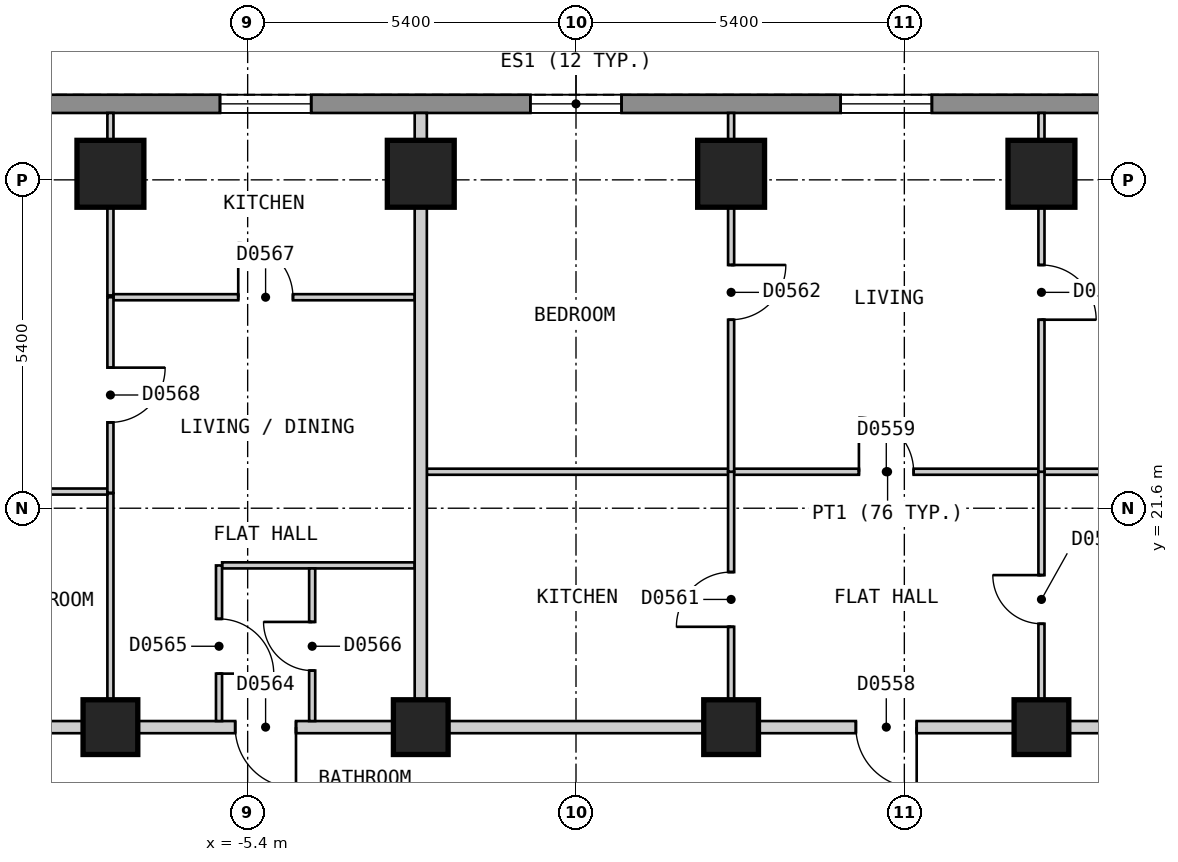
"""IFC4 building model, lengths in metres.
Left out: names, types, materials, properties, quantities, classifications, styles, units other than length and angle.
Written with IfcOpenShell. Run it as: python <this file> out.ifc"""

import sys

from ifc_helpers import new_model, si_unit, direction, frame, frame_2d, origin, origin_2d, place, context, subcontext, project, spatial, polyline, rectangle, outline, extrude, element, fill, save


model = new_model("IFC4")
c1 = context("Model", 3, precision=1e-05, world=origin(), true_north=direction((0.0, 1.0)))
c2 = subcontext(c1, "Body", "Model", "MODEL_VIEW")
j1 = project(units=[si_unit("LENGTHUNIT", "METRE"), si_unit("PLANEANGLEUNIT", "RADIAN")], contexts=[c1])
p1 = place(None, origin())
s1 = spatial("IfcSite", under=j1, at=p1, CompositionType="ELEMENT")
p2 = place(p1, origin())
s2 = spatial("IfcBuilding", under=s1, at=p2, CompositionType="ELEMENT")
p3 = place(p2, frame((0.0, 0.0, 44.4)))
s3 = spatial("IfcBuildingStorey", under=s2, at=p3, CompositionType="ELEMENT", Elevation=44.4)
for number, where, z_axis, x_axis in (
    (1, (7.655, 27.1, 0.0), (0.0, 0.0, 1.0), (-1.0, 0.0, 0.0)),
    (2, (2.551, 27.1, 0.0), (0.0, 0.0, 1.0), (-1.0, 0.0, 0.0)),
    (3, (-2.553, 27.1, 0.0), (0.0, 0.0, 1.0), (-1.0, 0.0, 0.0)),
    (4, (-7.657, 27.1, 0.0), (0.0, 0.0, 1.0), (-1.0, 0.0, 0.0)),
):
    element("IfcColumn", number, at=place(p3, frame(where, z_axis=z_axis, x_axis=x_axis)), inside=s3, PredefinedType="COLUMN", context=c2, shape_type="SweptSolid", body=[
        extrude(rectangle(XDim=1.1, YDim=1.1, at=origin_2d()), origin(), (0.0, 0.0, 1.0), 3.0),
    ])
for number, where, z_axis, x_axis in (
    (5, (7.655, 18.0, 0.0), (0.0, 0.0, 1.0), (-1.0, 0.0, 0.0)),
    (6, (2.551, 18.0, 0.0), (0.0, 0.0, 1.0), (-1.0, 0.0, 0.0)),
    (7, (-2.553, 18.0, 0.0), (0.0, 0.0, 1.0), (-1.0, 0.0, 0.0)),
    (8, (-7.657, 18.0, 0.0), (0.0, 0.0, 1.0), (-1.0, 0.0, 0.0)),
):
    element("IfcColumn", number, at=place(p3, frame(where, z_axis=z_axis, x_axis=x_axis)), inside=s3, PredefinedType="COLUMN", context=c2, shape_type="SweptSolid", body=[
        extrude(rectangle(XDim=0.9, YDim=0.9, at=origin_2d()), origin(), (0.0, 0.0, 1.0), 3.0),
    ])
p4 = place(p3, frame((13.51, 28.25, 0.0), z_axis=(0.0, 0.0, 1.0), x_axis=(-1.0, 0.0, 0.0)))
e9 = element("IfcWall", 9, at=p4, inside=s3, PredefinedType="SOLIDWALL", context=c2, shape_type="SweptSolid", body=[
    extrude(outline(polyline([(0.0, -0.15), (27.02, -0.15), (26.94, 0.15), (0.08, 0.15), (0.0, -0.15)])), origin(), (0.0, 0.0, 1.0), 2.7),
])
p5 = place(p4, frame((2.553, 0.0, 0.15)))
e10 = element("IfcOpeningElement", 10, at=p5, cuts=e9, PredefinedType="OPENING", context=c2, shape_type="SweptSolid", body=[
    extrude(rectangle(XDim=1.5, YDim=2.1, at=frame_2d((0.75, 1.05))), frame((0.0, 0.16, 0.0), z_axis=(0.0, -1.0, 0.0), x_axis=(1.0, 0.0, 0.0)), (0.0, 0.0, 1.0), 0.32),
])
p6 = place(p4, frame((7.657, 0.0, 0.15)))
e11 = element("IfcOpeningElement", 11, at=p6, cuts=e9, PredefinedType="OPENING", context=c2, shape_type="SweptSolid", body=[
    extrude(rectangle(XDim=1.5, YDim=2.1, at=frame_2d((0.75, 1.05))), frame((0.0, 0.16, 0.0), z_axis=(0.0, -1.0, 0.0), x_axis=(1.0, 0.0, 0.0)), (0.0, 0.0, 1.0), 0.32),
])
p7 = place(p4, frame((12.761, 0.0, 0.15)))
e12 = element("IfcOpeningElement", 12, at=p7, cuts=e9, PredefinedType="OPENING", context=c2, shape_type="SweptSolid", body=[
    extrude(rectangle(XDim=1.5, YDim=2.1, at=frame_2d((0.75, 1.05))), frame((0.0, 0.16, 0.0), z_axis=(0.0, -1.0, 0.0), x_axis=(1.0, 0.0, 0.0)), (0.0, 0.0, 1.0), 0.32),
])
p8 = place(p4, frame((17.865, 0.0, 0.15)))
e13 = element("IfcOpeningElement", 13, at=p8, cuts=e9, PredefinedType="OPENING", context=c2, shape_type="SweptSolid", body=[
    extrude(rectangle(XDim=1.5, YDim=2.1, at=frame_2d((0.75, 1.05))), frame((0.0, 0.16, 0.0), z_axis=(0.0, -1.0, 0.0), x_axis=(1.0, 0.0, 0.0)), (0.0, 0.0, 1.0), 0.32),
])
p9 = place(p4, frame((22.969, 0.0, 0.15)))
e14 = element("IfcOpeningElement", 14, at=p9, cuts=e9, PredefinedType="OPENING", context=c2, shape_type="SweptSolid", body=[
    extrude(rectangle(XDim=1.5, YDim=2.1, at=frame_2d((0.75, 1.05))), frame((0.0, 0.16, 0.0), z_axis=(0.0, -1.0, 0.0), x_axis=(1.0, 0.0, 0.0)), (0.0, 0.0, 1.0), 0.32),
])
p10 = place(p3, frame((-10.276, 18.0, 0.0), z_axis=(0.0, 0.0, 1.0), x_axis=(1.0, 0.0, 0.0)))
e15 = element("IfcWall", 15, at=p10, inside=s3, PredefinedType="PARTITIONING", context=c2, shape_type="SweptSolid", body=[
    extrude(rectangle(XDim=20.553, YDim=0.2, at=frame_2d((10.276, 0.0))), origin(), (0.0, 0.0, 1.0), 2.7),
])
p11 = place(p10, frame((14.879, 0.0, 0.0)))
e16 = element("IfcOpeningElement", 16, at=p11, cuts=e15, PredefinedType="OPENING", context=c2, shape_type="SweptSolid", body=[
    extrude(rectangle(XDim=1.0, YDim=2.1, at=frame_2d((0.5, 1.05))), frame((0.0, 0.11, 0.0), z_axis=(0.0, -1.0, 0.0), x_axis=(1.0, 0.0, 0.0)), (0.0, 0.0, 1.0), 0.22),
])
p12 = place(p10, frame((4.671, 0.0, 0.0)))
e17 = element("IfcOpeningElement", 17, at=p12, cuts=e15, PredefinedType="OPENING", context=c2, shape_type="SweptSolid", body=[
    extrude(rectangle(XDim=1.0, YDim=2.1, at=frame_2d((0.5, 1.05))), frame((0.0, 0.11, 0.0), z_axis=(0.0, -1.0, 0.0), x_axis=(1.0, 0.0, 0.0)), (0.0, 0.0, 1.0), 0.22),
])
p13 = place(p3, frame((-7.657, 28.1, 0.0), z_axis=(0.0, 0.0, 1.0), x_axis=(0.0, -1.0, 0.0)))
e18 = element("IfcWall", 18, at=p13, inside=s3, PredefinedType="PARTITIONING", context=c2, shape_type="SweptSolid", body=[
    extrude(rectangle(XDim=3.0, YDim=0.1, at=frame_2d((1.5, 0.0))), origin(), (0.0, 0.0, 1.0), 2.7),
])
p14 = place(p3, frame((-7.657, 21.844, 0.0), z_axis=(0.0, 0.0, 1.0), x_axis=(0.0, -1.0, 0.0)))
e19 = element("IfcWall", 19, at=p14, inside=s3, PredefinedType="PARTITIONING", context=c2, shape_type="SweptSolid", body=[
    extrude(rectangle(XDim=3.744, YDim=0.1, at=frame_2d((1.872, 0.0))), origin(), (0.0, 0.0, 1.0), 2.7),
])
p15 = place(p3, frame((-5.82, 20.66, 0.0), z_axis=(0.0, 0.0, 1.0), x_axis=(1.0, 0.0, 0.0)))
e20 = element("IfcWall", 20, at=p15, inside=s3, PredefinedType="PARTITIONING", context=c2, shape_type="SweptSolid", body=[
    extrude(rectangle(XDim=3.167, YDim=0.1, at=frame_2d((1.583, 0.0))), origin(), (0.0, 0.0, 1.0), 2.7),
])
p16 = place(p3, frame((-12.513, 21.874, 0.0), z_axis=(0.0, 0.0, 1.0), x_axis=(1.0, 0.0, 0.0)))
e21 = element("IfcWall", 21, at=p16, inside=s3, PredefinedType="PARTITIONING", context=c2, shape_type="SweptSolid", body=[
    extrude(rectangle(XDim=4.806, YDim=0.1, at=frame_2d((2.403, 0.0))), origin(), (0.0, 0.0, 1.0), 2.7),
])
p17 = place(p16, frame((1.97, 0.0, 0.0)))
e22 = element("IfcOpeningElement", 22, at=p17, cuts=e21, PredefinedType="OPENING", context=c2, shape_type="SweptSolid", body=[
    extrude(rectangle(XDim=0.8, YDim=2.1, at=frame_2d((0.4, 1.05))), frame((0.0, 0.06, 0.0), z_axis=(0.0, -1.0, 0.0), x_axis=(1.0, 0.0, 0.0)), (0.0, 0.0, 1.0), 0.12),
])
p18 = place(p3, frame((-2.453, 22.2, 0.0), z_axis=(0.0, 0.0, 1.0), x_axis=(1.0, 0.0, 0.0)))
e23 = element("IfcWall", 23, at=p18, inside=s3, PredefinedType="PARTITIONING", context=c2, shape_type="SweptSolid", body=[
    extrude(rectangle(XDim=15.155, YDim=0.1, at=frame_2d((7.577, 0.0))), origin(), (0.0, 0.0, 1.0), 2.7),
])
p19 = place(p18, frame((7.106, 0.0, 0.0)))
e24 = element("IfcOpeningElement", 24, at=p19, cuts=e23, PredefinedType="OPENING", context=c2, shape_type="SweptSolid", body=[
    extrude(rectangle(XDim=0.9, YDim=2.1, at=frame_2d((0.45, 1.05))), frame((0.0, 0.06, 0.0), z_axis=(0.0, -1.0, 0.0), x_axis=(1.0, 0.0, 0.0)), (0.0, 0.0, 1.0), 0.12),
])
p20 = place(p3, frame((-7.607, 25.07, 0.0), z_axis=(0.0, 0.0, 1.0), x_axis=(1.0, 0.0, 0.0)))
e25 = element("IfcWall", 25, at=p20, inside=s3, PredefinedType="PARTITIONING", context=c2, shape_type="SweptSolid", body=[
    extrude(rectangle(XDim=4.954, YDim=0.1, at=frame_2d((2.477, 0.0))), origin(), (0.0, 0.0, 1.0), 2.7),
])
p21 = place(p20, frame((2.052, 0.0, 0.0)))
e26 = element("IfcOpeningElement", 26, at=p21, cuts=e25, PredefinedType="OPENING", context=c2, shape_type="SweptSolid", body=[
    extrude(rectangle(XDim=0.9, YDim=2.1, at=frame_2d((0.45, 1.05))), frame((0.0, 0.06, 0.0), z_axis=(0.0, -1.0, 0.0), x_axis=(1.0, 0.0, 0.0)), (0.0, 0.0, 1.0), 0.12),
])
p22 = place(p3, frame((7.655, 18.1, 0.0), z_axis=(0.0, 0.0, 1.0), x_axis=(0.0, 1.0, 0.0)))
e27 = element("IfcWall", 27, at=p22, inside=s3, PredefinedType="PARTITIONING", context=c2, shape_type="SweptSolid", body=[
    extrude(rectangle(XDim=4.1, YDim=0.1, at=frame_2d((2.05, 0.0))), origin(), (0.0, 0.0, 1.0), 2.7),
])
p23 = place(p22, frame((1.6, 0.0, 0.0)))
e28 = element("IfcOpeningElement", 28, at=p23, cuts=e27, PredefinedType="OPENING", context=c2, shape_type="SweptSolid", body=[
    extrude(rectangle(XDim=0.8, YDim=2.1, at=frame_2d((0.4, 1.05))), frame((0.0, 0.06, 0.0), z_axis=(0.0, -1.0, 0.0), x_axis=(1.0, 0.0, 0.0)), (0.0, 0.0, 1.0), 0.12),
])
p24 = place(p3, frame((2.551, 18.1, 0.0), z_axis=(0.0, 0.0, 1.0), x_axis=(0.0, 1.0, 0.0)))
e29 = element("IfcWall", 29, at=p24, inside=s3, PredefinedType="PARTITIONING", context=c2, shape_type="SweptSolid", body=[
    extrude(rectangle(XDim=4.1, YDim=0.1, at=frame_2d((2.05, 0.0))), origin(), (0.0, 0.0, 1.0), 2.7),
])
p25 = place(p24, frame((1.55, 0.0, 0.0)))
e30 = element("IfcOpeningElement", 30, at=p25, cuts=e29, PredefinedType="OPENING", context=c2, shape_type="SweptSolid", body=[
    extrude(rectangle(XDim=0.9, YDim=2.1, at=frame_2d((0.45, 1.05))), frame((0.0, 0.06, 0.0), z_axis=(0.0, -1.0, 0.0), x_axis=(1.0, 0.0, 0.0)), (0.0, 0.0, 1.0), 0.12),
])
p26 = place(p3, frame((-4.339, 18.1, 0.0), z_axis=(0.0, 0.0, 1.0), x_axis=(0.0, 1.0, 0.0)))
e31 = element("IfcWall", 31, at=p26, inside=s3, PredefinedType="PARTITIONING", context=c2, shape_type="SweptSolid", body=[
    extrude(rectangle(XDim=2.51, YDim=0.1, at=frame_2d((1.255, 0.0))), origin(), (0.0, 0.0, 1.0), 2.7),
])
p27 = place(p26, frame((0.83, 0.0, 0.0)))
e32 = element("IfcOpeningElement", 32, at=p27, cuts=e31, PredefinedType="OPENING", context=c2, shape_type="SweptSolid", body=[
    extrude(rectangle(XDim=0.8, YDim=2.1, at=frame_2d((0.4, 1.05))), frame((0.0, 0.06, 0.0), z_axis=(0.0, -1.0, 0.0), x_axis=(1.0, 0.0, 0.0)), (0.0, 0.0, 1.0), 0.12),
])
p28 = place(p3, frame((-5.871, 18.1, 0.0), z_axis=(0.0, 0.0, 1.0), x_axis=(0.0, 1.0, 0.0)))
e33 = element("IfcWall", 33, at=p28, inside=s3, PredefinedType="PARTITIONING", context=c2, shape_type="SweptSolid", body=[
    extrude(rectangle(XDim=2.559, YDim=0.1, at=frame_2d((1.279, 0.0))), origin(), (0.0, 0.0, 1.0), 2.7),
])
p29 = place(p28, frame((0.78, 0.0, 0.0)))
e34 = element("IfcOpeningElement", 34, at=p29, cuts=e33, PredefinedType="OPENING", context=c2, shape_type="SweptSolid", body=[
    extrude(rectangle(XDim=0.9, YDim=2.1, at=frame_2d((0.45, 1.05))), frame((0.0, 0.06, 0.0), z_axis=(0.0, -1.0, 0.0), x_axis=(1.0, 0.0, 0.0)), (0.0, 0.0, 1.0), 0.12),
])
p30 = place(p3, frame((-7.657, 21.854, 0.0), z_axis=(0.0, 0.0, 1.0), x_axis=(0.0, 1.0, 0.0)))
e35 = element("IfcWall", 35, at=p30, inside=s3, PredefinedType="PARTITIONING", context=c2, shape_type="SweptSolid", body=[
    extrude(rectangle(XDim=3.216, YDim=0.1, at=frame_2d((1.608, 0.0))), origin(), (0.0, 0.0, 1.0), 2.7),
])
p31 = place(p30, frame((1.158, 0.0, 0.0)))
e36 = element("IfcOpeningElement", 36, at=p31, cuts=e35, PredefinedType="OPENING", context=c2, shape_type="SweptSolid", body=[
    extrude(rectangle(XDim=0.9, YDim=2.1, at=frame_2d((0.45, 1.05))), frame((0.0, 0.06, 0.0), z_axis=(0.0, -1.0, 0.0), x_axis=(1.0, 0.0, 0.0)), (0.0, 0.0, 1.0), 0.12),
])
p32 = place(p3, frame((-2.553, 18.1, 0.0), z_axis=(0.0, 0.0, 1.0), x_axis=(0.0, 1.0, 0.0)))
e37 = element("IfcWall", 37, at=p32, inside=s3, PredefinedType="PARTITIONING", context=c2, shape_type="SweptSolid", body=[
    extrude(rectangle(XDim=10.0, YDim=0.2, at=frame_2d((5.0, 0.0))), origin(), (0.0, 0.0, 1.0), 2.7),
])
p33 = place(p3, frame((7.655, 22.2, 0.0), z_axis=(0.0, 0.0, 1.0), x_axis=(0.0, 1.0, 0.0)))
e38 = element("IfcWall", 38, at=p33, inside=s3, PredefinedType="PARTITIONING", context=c2, shape_type="SweptSolid", body=[
    extrude(rectangle(XDim=5.9, YDim=0.1, at=frame_2d((2.95, 0.0))), origin(), (0.0, 0.0, 1.0), 2.7),
])
p34 = place(p33, frame((2.5, 0.0, 0.0)))
e39 = element("IfcOpeningElement", 39, at=p34, cuts=e38, PredefinedType="OPENING", context=c2, shape_type="SweptSolid", body=[
    extrude(rectangle(XDim=0.9, YDim=2.1, at=frame_2d((0.45, 1.05))), frame((0.0, 0.06, 0.0), z_axis=(0.0, -1.0, 0.0), x_axis=(1.0, 0.0, 0.0)), (0.0, 0.0, 1.0), 0.12),
])
p35 = place(p3, frame((2.551, 22.2, 0.0), z_axis=(0.0, 0.0, 1.0), x_axis=(0.0, 1.0, 0.0)))
e40 = element("IfcWall", 40, at=p35, inside=s3, PredefinedType="PARTITIONING", context=c2, shape_type="SweptSolid", body=[
    extrude(rectangle(XDim=5.9, YDim=0.1, at=frame_2d((2.95, 0.0))), origin(), (0.0, 0.0, 1.0), 2.7),
])
p36 = place(p35, frame((2.5, 0.0, 0.0)))
e41 = element("IfcOpeningElement", 41, at=p36, cuts=e40, PredefinedType="OPENING", context=c2, shape_type="SweptSolid", body=[
    extrude(rectangle(XDim=0.9, YDim=2.1, at=frame_2d((0.45, 1.05))), frame((0.0, 0.06, 0.0), z_axis=(0.0, -1.0, 0.0), x_axis=(1.0, 0.0, 0.0)), (0.0, 0.0, 1.0), 0.12),
])
p37 = place(p6, origin())
e42 = element("IfcWindow", 42, at=p37, inside=s3, PartitioningType="SINGLE_PANEL", PredefinedType="WINDOW", context=c2, shape_type="SweptSolid", body=[
    extrude(rectangle(XDim=1.5, YDim=2.1, at=frame_2d((0.75, 1.05))), frame((0.0, 0.03, 0.0), z_axis=(0.0, -1.0, 0.0), x_axis=(1.0, 0.0, 0.0)), (0.0, 0.0, 1.0), 0.06),
])
fill(e11, e42)
p38 = place(p7, origin())
e43 = element("IfcWindow", 43, at=p38, inside=s3, PartitioningType="SINGLE_PANEL", PredefinedType="WINDOW", context=c2, shape_type="SweptSolid", body=[
    extrude(rectangle(XDim=1.5, YDim=2.1, at=frame_2d((0.75, 1.05))), frame((0.0, 0.03, 0.0), z_axis=(0.0, -1.0, 0.0), x_axis=(1.0, 0.0, 0.0)), (0.0, 0.0, 1.0), 0.06),
])
fill(e12, e43)
p39 = place(p8, origin())
e44 = element("IfcWindow", 44, at=p39, inside=s3, PartitioningType="SINGLE_PANEL", PredefinedType="WINDOW", context=c2, shape_type="SweptSolid", body=[
    extrude(rectangle(XDim=1.5, YDim=2.1, at=frame_2d((0.75, 1.05))), frame((0.0, 0.03, 0.0), z_axis=(0.0, -1.0, 0.0), x_axis=(1.0, 0.0, 0.0)), (0.0, 0.0, 1.0), 0.06),
])
fill(e13, e44)
p40 = place(p11, origin())
e45 = element("IfcDoor", 45, at=p40, inside=s3, OperationType="SINGLE_SWING_RIGHT", PredefinedType="DOOR", context=c2, shape_type="SweptSolid", body=[
    extrude(rectangle(XDim=1.0, YDim=2.1, at=frame_2d((0.5, 1.05))), frame((0.0, 0.025, 0.0), z_axis=(0.0, -1.0, 0.0), x_axis=(1.0, 0.0, 0.0)), (0.0, 0.0, 1.0), 0.05),
])
fill(e16, e45)
p41 = place(p19, origin())
e46 = element("IfcDoor", 46, at=p41, inside=s3, OperationType="SINGLE_SWING_LEFT", PredefinedType="DOOR", context=c2, shape_type="SweptSolid", body=[
    extrude(rectangle(XDim=0.9, YDim=2.1, at=frame_2d((0.45, 1.05))), frame((0.0, 0.025, 0.0), z_axis=(0.0, -1.0, 0.0), x_axis=(1.0, 0.0, 0.0)), (0.0, 0.0, 1.0), 0.05),
])
fill(e24, e46)
p42 = place(p23, origin())
e47 = element("IfcDoor", 47, at=p42, inside=s3, OperationType="SINGLE_SWING_RIGHT", PredefinedType="DOOR", context=c2, shape_type="SweptSolid", body=[
    extrude(rectangle(XDim=0.8, YDim=2.1, at=frame_2d((0.4, 1.05))), frame((0.0, 0.025, 0.0), z_axis=(0.0, -1.0, 0.0), x_axis=(1.0, 0.0, 0.0)), (0.0, 0.0, 1.0), 0.05),
])
fill(e28, e47)
p43 = place(p25, origin())
e48 = element("IfcDoor", 48, at=p43, inside=s3, OperationType="SINGLE_SWING_LEFT", PredefinedType="DOOR", context=c2, shape_type="SweptSolid", body=[
    extrude(rectangle(XDim=0.9, YDim=2.1, at=frame_2d((0.45, 1.05))), frame((0.0, 0.025, 0.0), z_axis=(0.0, -1.0, 0.0), x_axis=(1.0, 0.0, 0.0)), (0.0, 0.0, 1.0), 0.05),
])
fill(e30, e48)
p44 = place(p36, origin())
e49 = element("IfcDoor", 49, at=p44, inside=s3, OperationType="SINGLE_SWING_RIGHT", PredefinedType="DOOR", context=c2, shape_type="SweptSolid", body=[
    extrude(rectangle(XDim=0.9, YDim=2.1, at=frame_2d((0.45, 1.05))), frame((0.0, 0.025, 0.0), z_axis=(0.0, -1.0, 0.0), x_axis=(1.0, 0.0, 0.0)), (0.0, 0.0, 1.0), 0.05),
])
fill(e41, e49)
p45 = place(p34, origin())
e50 = element("IfcDoor", 50, at=p45, inside=s3, OperationType="SINGLE_SWING_LEFT", PredefinedType="DOOR", context=c2, shape_type="SweptSolid", body=[
    extrude(rectangle(XDim=0.9, YDim=2.1, at=frame_2d((0.45, 1.05))), frame((0.0, 0.025, 0.0), z_axis=(0.0, -1.0, 0.0), x_axis=(1.0, 0.0, 0.0)), (0.0, 0.0, 1.0), 0.05),
])
fill(e39, e50)
p46 = place(p12, origin())
e51 = element("IfcDoor", 51, at=p46, inside=s3, OperationType="SINGLE_SWING_RIGHT", PredefinedType="DOOR", context=c2, shape_type="SweptSolid", body=[
    extrude(rectangle(XDim=1.0, YDim=2.1, at=frame_2d((0.5, 1.05))), frame((0.0, 0.025, 0.0), z_axis=(0.0, -1.0, 0.0), x_axis=(1.0, 0.0, 0.0)), (0.0, 0.0, 1.0), 0.05),
])
fill(e17, e51)
p47 = place(p29, origin())
e52 = element("IfcDoor", 52, at=p47, inside=s3, OperationType="SINGLE_SWING_LEFT", PredefinedType="DOOR", context=c2, shape_type="SweptSolid", body=[
    extrude(rectangle(XDim=0.9, YDim=2.1, at=frame_2d((0.45, 1.05))), frame((0.0, 0.025, 0.0), z_axis=(0.0, -1.0, 0.0), x_axis=(1.0, 0.0, 0.0)), (0.0, 0.0, 1.0), 0.05),
])
fill(e34, e52)
p48 = place(p27, origin())
e53 = element("IfcDoor", 53, at=p48, inside=s3, OperationType="SINGLE_SWING_RIGHT", PredefinedType="DOOR", context=c2, shape_type="SweptSolid", body=[
    extrude(rectangle(XDim=0.8, YDim=2.1, at=frame_2d((0.4, 1.05))), frame((0.0, 0.025, 0.0), z_axis=(0.0, -1.0, 0.0), x_axis=(1.0, 0.0, 0.0)), (0.0, 0.0, 1.0), 0.05),
])
fill(e32, e53)
p49 = place(p21, origin())
e54 = element("IfcDoor", 54, at=p49, inside=s3, OperationType="SINGLE_SWING_LEFT", PredefinedType="DOOR", context=c2, shape_type="SweptSolid", body=[
    extrude(rectangle(XDim=0.9, YDim=2.1, at=frame_2d((0.45, 1.05))), frame((0.0, 0.025, 0.0), z_axis=(0.0, -1.0, 0.0), x_axis=(1.0, 0.0, 0.0)), (0.0, 0.0, 1.0), 0.05),
])
fill(e26, e54)
p50 = place(p31, origin())
e55 = element("IfcDoor", 55, at=p50, inside=s3, OperationType="SINGLE_SWING_RIGHT", PredefinedType="DOOR", context=c2, shape_type="SweptSolid", body=[
    extrude(rectangle(XDim=0.9, YDim=2.1, at=frame_2d((0.45, 1.05))), frame((0.0, 0.025, 0.0), z_axis=(0.0, -1.0, 0.0), x_axis=(1.0, 0.0, 0.0)), (0.0, 0.0, 1.0), 0.05),
])
fill(e36, e55)
save(model, sys.argv[1])
